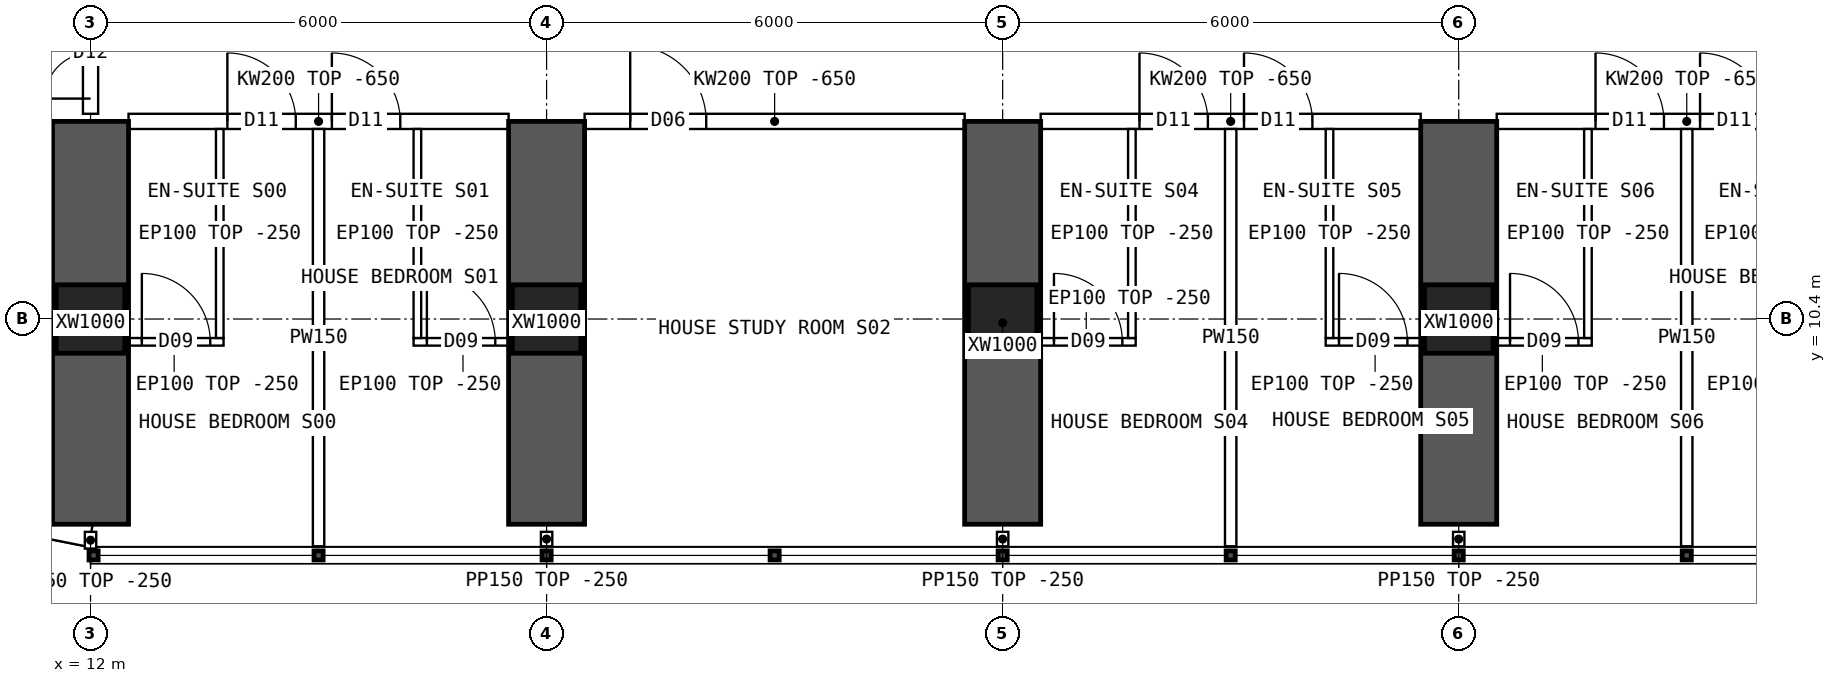
"""IFC4 building model, lengths in metres.
Left out: names, types, materials, properties, quantities, classifications, styles, units other than length and angle.
Written with IfcOpenShell. Run it as: python <this file> out.ifc"""

import sys

from ifc_helpers import new_model, si_unit, direction, frame, frame_2d, origin, origin_2d, place, context, subcontext, project, spatial, polyline, rectangle, hollow_rectangle, outline, extrude, element, fill, save


model = new_model("IFC4")
c1 = context("Model", 3, precision=1e-05, world=origin(), true_north=direction((0.0, 1.0)))
c2 = subcontext(c1, "Body", "Model", "MODEL_VIEW")
j1 = project(units=[si_unit("LENGTHUNIT", "METRE"), si_unit("PLANEANGLEUNIT", "RADIAN")], contexts=[c1])
p1 = place(None, origin())
s1 = spatial("IfcSite", under=j1, at=p1, CompositionType="ELEMENT")
p2 = place(p1, origin())
s2 = spatial("IfcBuilding", under=s1, at=p2, CompositionType="ELEMENT")
p3 = place(p2, frame((0.0, 0.0, 46.45)))
s3 = spatial("IfcBuildingStorey", under=s2, at=p3, CompositionType="ELEMENT", Elevation=46.45)
for number, where, z_axis, x_axis in (
    (1, (12.0, 10.4, 0.0), (0.0, 0.0, 1.0), (1.0, 0.0, 0.0)),
    (2, (18.0, 10.4, 0.0), (0.0, 0.0, 1.0), (1.0, 0.0, 0.0)),
    (3, (24.0, 10.4, 0.0), (0.0, 0.0, 1.0), (1.0, 0.0, 0.0)),
    (4, (30.0, 10.4, 0.0), (0.0, 0.0, 1.0), (1.0, 0.0, 0.0)),
):
    element("IfcColumn", number, at=place(p3, frame(where, z_axis=z_axis, x_axis=x_axis)), inside=s3, PredefinedType="COLUMN", context=c2, shape_type="SweptSolid", body=[
        extrude(hollow_rectangle(XDim=0.9, YDim=0.9, WallThickness=0.09, at=origin_2d()), origin(), (0.0, 0.0, 1.0), 3.75),
    ])
for number, where, z_axis, x_axis in (
    (5, (12.0, 7.7, 0.0), (0.0, 0.0, 1.0), (0.0, 1.0, 0.0)),
    (6, (18.0, 7.7, 0.0), (0.0, 0.0, 1.0), (0.0, 1.0, 0.0)),
    (7, (24.0, 7.7, 0.0), (0.0, 0.0, 1.0), (0.0, 1.0, 0.0)),
    (8, (30.0, 7.7, 0.0), (0.0, 0.0, 1.0), (0.0, 1.0, 0.0)),
):
    element("IfcWall", number, at=place(p3, frame(where, z_axis=z_axis, x_axis=x_axis)), inside=s3, PredefinedType="SHEAR", context=c2, shape_type="SweptSolid", body=[
        extrude(rectangle(XDim=5.3, YDim=1.0, at=frame_2d((2.65, 0.0))), origin(), (0.0, 0.0, 1.0), 3.75),
    ])
p4 = place(p3, frame((8.843, 8.178, 0.0), z_axis=(0.0, 0.0, 1.0), x_axis=(0.980787251524, -0.195080412259, 0.0)))
e9 = element("IfcWall", 9, at=p4, inside=s3, PredefinedType="SOLIDWALL", context=c2, shape_type="SweptSolid", body=[
    extrude(outline(polyline([(-0.03, -0.15), (3.249, -0.15), (3.189, 0.15), (0.03, 0.15), (-0.03, -0.15)])), origin(), (0.0, 0.0, 1.0), 3.5),
])
p5 = place(p4, frame((0.909, 0.0, 0.9)))
e10 = element("IfcOpeningElement", 10, at=p5, cuts=e9, PredefinedType="OPENING", context=c2, shape_type="SweptSolid", body=[
    extrude(rectangle(XDim=1.4, YDim=1.8, at=frame_2d((0.7, 0.9))), frame((0.0, 0.16, 0.0), z_axis=(0.0, -1.0, 0.0), x_axis=(1.0, 0.0, 0.0)), (0.0, 0.0, 1.0), 0.32),
])
p6 = place(p3, frame((12.5, 13.0, 0.0), z_axis=(0.0, 0.0, 1.0), x_axis=(1.0, 0.0, 0.0)))
e11 = element("IfcWall", 11, at=p6, inside=s3, PredefinedType="SOLIDWALL", context=c2, shape_type="SweptSolid", body=[
    extrude(outline(polyline([(0.0, 0.0), (5.0, 0.0), (5.0, 3.1), (0.0, 3.1), (0.0, 0.0)])), frame((0.0, 0.1, 0.0), z_axis=(0.0, -1.0, 0.0), x_axis=(1.0, 0.0, 0.0)), (0.0, 0.0, 1.0), 0.2),
])
p7 = place(p6, frame((1.3, 0.0, 0.0)))
e12 = element("IfcOpeningElement", 12, at=p7, cuts=e11, PredefinedType="OPENING", context=c2, shape_type="SweptSolid", body=[
    extrude(rectangle(XDim=0.9, YDim=2.1, at=frame_2d((0.45, 1.05))), frame((0.0, 0.11, 0.0), z_axis=(0.0, -1.0, 0.0), x_axis=(1.0, 0.0, 0.0)), (0.0, 0.0, 1.0), 0.22),
])
p8 = place(p6, frame((2.675, 0.0, 0.0)))
e13 = element("IfcOpeningElement", 13, at=p8, cuts=e11, PredefinedType="OPENING", context=c2, shape_type="SweptSolid", body=[
    extrude(rectangle(XDim=0.9, YDim=2.1, at=frame_2d((0.45, 1.05))), frame((0.0, 0.11, 0.0), z_axis=(0.0, -1.0, 0.0), x_axis=(1.0, 0.0, 0.0)), (0.0, 0.0, 1.0), 0.22),
])
p9 = place(p3, frame((18.5, 13.0, 0.0), z_axis=(0.0, 0.0, 1.0), x_axis=(1.0, 0.0, 0.0)))
e14 = element("IfcWall", 14, at=p9, inside=s3, PredefinedType="SOLIDWALL", context=c2, shape_type="SweptSolid", body=[
    extrude(outline(polyline([(0.0, 0.0), (5.0, 0.0), (5.0, 3.1), (0.0, 3.1), (0.0, 0.0)])), frame((0.0, 0.1, 0.0), z_axis=(0.0, -1.0, 0.0), x_axis=(1.0, 0.0, 0.0)), (0.0, 0.0, 1.0), 0.2),
])
p10 = place(p9, frame((0.6, 0.0, 0.0)))
e15 = element("IfcOpeningElement", 15, at=p10, cuts=e14, PredefinedType="OPENING", context=c2, shape_type="SweptSolid", body=[
    extrude(rectangle(XDim=1.0, YDim=2.1, at=frame_2d((0.5, 1.05))), frame((0.0, 0.11, 0.0), z_axis=(0.0, -1.0, 0.0), x_axis=(1.0, 0.0, 0.0)), (0.0, 0.0, 1.0), 0.22),
])
p11 = place(p3, frame((24.5, 13.0, 0.0), z_axis=(0.0, 0.0, 1.0), x_axis=(1.0, 0.0, 0.0)))
e16 = element("IfcWall", 16, at=p11, inside=s3, PredefinedType="SOLIDWALL", context=c2, shape_type="SweptSolid", body=[
    extrude(outline(polyline([(0.0, 0.0), (5.0, 0.0), (5.0, 3.1), (0.0, 3.1), (0.0, 0.0)])), frame((0.0, 0.1, 0.0), z_axis=(0.0, -1.0, 0.0), x_axis=(1.0, 0.0, 0.0)), (0.0, 0.0, 1.0), 0.2),
])
p12 = place(p11, frame((1.3, 0.0, 0.0)))
e17 = element("IfcOpeningElement", 17, at=p12, cuts=e16, PredefinedType="OPENING", context=c2, shape_type="SweptSolid", body=[
    extrude(rectangle(XDim=0.9, YDim=2.1, at=frame_2d((0.45, 1.05))), frame((0.0, 0.11, 0.0), z_axis=(0.0, -1.0, 0.0), x_axis=(1.0, 0.0, 0.0)), (0.0, 0.0, 1.0), 0.22),
])
p13 = place(p11, frame((2.675, 0.0, 0.0)))
e18 = element("IfcOpeningElement", 18, at=p13, cuts=e16, PredefinedType="OPENING", context=c2, shape_type="SweptSolid", body=[
    extrude(rectangle(XDim=0.9, YDim=2.1, at=frame_2d((0.45, 1.05))), frame((0.0, 0.11, 0.0), z_axis=(0.0, -1.0, 0.0), x_axis=(1.0, 0.0, 0.0)), (0.0, 0.0, 1.0), 0.22),
])
p14 = place(p3, frame((30.5, 13.0, 0.0), z_axis=(0.0, 0.0, 1.0), x_axis=(1.0, 0.0, 0.0)))
e19 = element("IfcWall", 19, at=p14, inside=s3, PredefinedType="SOLIDWALL", context=c2, shape_type="SweptSolid", body=[
    extrude(outline(polyline([(0.0, 0.0), (5.0, 0.0), (5.0, 3.1), (0.0, 3.1), (0.0, 0.0)])), frame((0.0, 0.1, 0.0), z_axis=(0.0, -1.0, 0.0), x_axis=(1.0, 0.0, 0.0)), (0.0, 0.0, 1.0), 0.2),
])
p15 = place(p14, frame((1.3, 0.0, 0.0)))
e20 = element("IfcOpeningElement", 20, at=p15, cuts=e19, PredefinedType="OPENING", context=c2, shape_type="SweptSolid", body=[
    extrude(rectangle(XDim=0.9, YDim=2.1, at=frame_2d((0.45, 1.05))), frame((0.0, 0.11, 0.0), z_axis=(0.0, -1.0, 0.0), x_axis=(1.0, 0.0, 0.0)), (0.0, 0.0, 1.0), 0.22),
])
p16 = place(p14, frame((2.675, 0.0, 0.0)))
e21 = element("IfcOpeningElement", 21, at=p16, cuts=e19, PredefinedType="OPENING", context=c2, shape_type="SweptSolid", body=[
    extrude(rectangle(XDim=0.9, YDim=2.1, at=frame_2d((0.45, 1.05))), frame((0.0, 0.11, 0.0), z_axis=(0.0, -1.0, 0.0), x_axis=(1.0, 0.0, 0.0)), (0.0, 0.0, 1.0), 0.22),
])
p17 = place(p3, frame((15.0, 7.41, 0.0), z_axis=(0.0, 0.0, 1.0), x_axis=(0.0, 1.0, 0.0)))
e22 = element("IfcWall", 22, at=p17, inside=s3, PredefinedType="PARTITIONING", context=c2, shape_type="SweptSolid", body=[
    extrude(outline(polyline([(0.0, 0.0), (5.49, 0.0), (5.49, 3.1), (5.442, 3.1), (5.44, 3.5), (3.192, 3.5), (3.19, 3.1), (2.792, 3.1), (2.79, 3.5), (0.0, 3.5), (0.0, 0.0)])), frame((0.0, 0.075, 0.0), z_axis=(0.0, -1.0, 0.0), x_axis=(1.0, 0.0, 0.0)), (0.0, 0.0, 1.0), 0.15),
])
p18 = place(p3, frame((13.75, 10.1, 0.0), z_axis=(0.0, 0.0, 1.0), x_axis=(-1.0, 0.0, 0.0)))
e23 = element("IfcWall", 23, at=p18, inside=s3, PredefinedType="PARTITIONING", context=c2, shape_type="SweptSolid", body=[
    extrude(rectangle(XDim=1.3, YDim=0.1, at=frame_2d((0.65, 0.0))), origin(), (0.0, 0.0, 1.0), 3.5),
])
p19 = place(p18, frame((0.175, 0.0, 0.0)))
e24 = element("IfcOpeningElement", 24, at=p19, cuts=e23, PredefinedType="OPENING", context=c2, shape_type="SweptSolid", body=[
    extrude(rectangle(XDim=0.9, YDim=2.1, at=frame_2d((0.45, 1.05))), frame((0.0, 0.06, 0.0), z_axis=(0.0, -1.0, 0.0), x_axis=(1.0, 0.0, 0.0)), (0.0, 0.0, 1.0), 0.12),
])
p20 = place(p3, frame((13.7, 10.15, 0.0), z_axis=(0.0, 0.0, 1.0), x_axis=(0.0, 1.0, 0.0)))
e25 = element("IfcWall", 25, at=p20, inside=s3, PredefinedType="PARTITIONING", context=c2, shape_type="SweptSolid", body=[
    extrude(outline(polyline([(0.0, 0.0), (2.75, 0.0), (2.75, 3.1), (2.702, 3.1), (2.7, 3.5), (0.452, 3.5), (0.45, 3.1), (0.052, 3.1), (0.05, 3.5), (0.0, 3.5), (0.0, 0.0)])), frame((0.0, 0.05, 0.0), z_axis=(0.0, -1.0, 0.0), x_axis=(1.0, 0.0, 0.0)), (0.0, 0.0, 1.0), 0.1),
])
p21 = place(p3, frame((17.55, 10.1, 0.0), z_axis=(0.0, 0.0, 1.0), x_axis=(-1.0, 0.0, 0.0)))
e26 = element("IfcWall", 26, at=p21, inside=s3, PredefinedType="PARTITIONING", context=c2, shape_type="SweptSolid", body=[
    extrude(rectangle(XDim=1.3, YDim=0.1, at=frame_2d((0.65, 0.0))), origin(), (0.0, 0.0, 1.0), 3.5),
])
p22 = place(p21, frame((0.225, 0.0, 0.0)))
e27 = element("IfcOpeningElement", 27, at=p22, cuts=e26, PredefinedType="OPENING", context=c2, shape_type="SweptSolid", body=[
    extrude(rectangle(XDim=0.9, YDim=2.1, at=frame_2d((0.45, 1.05))), frame((0.0, 0.06, 0.0), z_axis=(0.0, -1.0, 0.0), x_axis=(1.0, 0.0, 0.0)), (0.0, 0.0, 1.0), 0.12),
])
p23 = place(p3, frame((16.3, 10.15, 0.0), z_axis=(0.0, 0.0, 1.0), x_axis=(0.0, 1.0, 0.0)))
e28 = element("IfcWall", 28, at=p23, inside=s3, PredefinedType="PARTITIONING", context=c2, shape_type="SweptSolid", body=[
    extrude(outline(polyline([(0.0, 0.0), (2.75, 0.0), (2.75, 3.1), (2.702, 3.1), (2.7, 3.5), (0.452, 3.5), (0.45, 3.1), (0.052, 3.1), (0.05, 3.5), (0.0, 3.5), (0.0, 0.0)])), frame((0.0, 0.05, 0.0), z_axis=(0.0, -1.0, 0.0), x_axis=(1.0, 0.0, 0.0)), (0.0, 0.0, 1.0), 0.1),
])
p24 = place(p3, frame((27.0, 7.41, 0.0), z_axis=(0.0, 0.0, 1.0), x_axis=(0.0, 1.0, 0.0)))
e29 = element("IfcWall", 29, at=p24, inside=s3, PredefinedType="PARTITIONING", context=c2, shape_type="SweptSolid", body=[
    extrude(outline(polyline([(0.0, 0.0), (5.49, 0.0), (5.49, 3.1), (5.442, 3.1), (5.44, 3.5), (3.192, 3.5), (3.19, 3.1), (2.792, 3.1), (2.79, 3.5), (0.0, 3.5), (0.0, 0.0)])), frame((0.0, 0.075, 0.0), z_axis=(0.0, -1.0, 0.0), x_axis=(1.0, 0.0, 0.0)), (0.0, 0.0, 1.0), 0.15),
])
p25 = place(p3, frame((25.75, 10.1, 0.0), z_axis=(0.0, 0.0, 1.0), x_axis=(-1.0, 0.0, 0.0)))
e30 = element("IfcWall", 30, at=p25, inside=s3, PredefinedType="PARTITIONING", context=c2, shape_type="SweptSolid", body=[
    extrude(rectangle(XDim=1.3, YDim=0.1, at=frame_2d((0.65, 0.0))), origin(), (0.0, 0.0, 1.0), 3.5),
])
p26 = place(p25, frame((0.175, 0.0, 0.0)))
e31 = element("IfcOpeningElement", 31, at=p26, cuts=e30, PredefinedType="OPENING", context=c2, shape_type="SweptSolid", body=[
    extrude(rectangle(XDim=0.9, YDim=2.1, at=frame_2d((0.45, 1.05))), frame((0.0, 0.06, 0.0), z_axis=(0.0, -1.0, 0.0), x_axis=(1.0, 0.0, 0.0)), (0.0, 0.0, 1.0), 0.12),
])
p27 = place(p3, frame((25.7, 10.15, 0.0), z_axis=(0.0, 0.0, 1.0), x_axis=(0.0, 1.0, 0.0)))
e32 = element("IfcWall", 32, at=p27, inside=s3, PredefinedType="PARTITIONING", context=c2, shape_type="SweptSolid", body=[
    extrude(outline(polyline([(0.0, 0.0), (2.75, 0.0), (2.75, 3.1), (2.702, 3.1), (2.7, 3.5), (0.452, 3.5), (0.45, 3.1), (0.052, 3.1), (0.05, 3.5), (0.0, 3.5), (0.0, 0.0)])), frame((0.0, 0.05, 0.0), z_axis=(0.0, -1.0, 0.0), x_axis=(1.0, 0.0, 0.0)), (0.0, 0.0, 1.0), 0.1),
])
p28 = place(p3, frame((29.55, 10.1, 0.0), z_axis=(0.0, 0.0, 1.0), x_axis=(-1.0, 0.0, 0.0)))
e33 = element("IfcWall", 33, at=p28, inside=s3, PredefinedType="PARTITIONING", context=c2, shape_type="SweptSolid", body=[
    extrude(rectangle(XDim=1.3, YDim=0.1, at=frame_2d((0.65, 0.0))), origin(), (0.0, 0.0, 1.0), 3.5),
])
p29 = place(p28, frame((0.225, 0.0, 0.0)))
e34 = element("IfcOpeningElement", 34, at=p29, cuts=e33, PredefinedType="OPENING", context=c2, shape_type="SweptSolid", body=[
    extrude(rectangle(XDim=0.9, YDim=2.1, at=frame_2d((0.45, 1.05))), frame((0.0, 0.06, 0.0), z_axis=(0.0, -1.0, 0.0), x_axis=(1.0, 0.0, 0.0)), (0.0, 0.0, 1.0), 0.12),
])
p30 = place(p3, frame((28.3, 10.15, 0.0), z_axis=(0.0, 0.0, 1.0), x_axis=(0.0, 1.0, 0.0)))
e35 = element("IfcWall", 35, at=p30, inside=s3, PredefinedType="PARTITIONING", context=c2, shape_type="SweptSolid", body=[
    extrude(outline(polyline([(0.0, 0.0), (2.75, 0.0), (2.75, 3.1), (2.702, 3.1), (2.7, 3.5), (0.452, 3.5), (0.45, 3.1), (0.052, 3.1), (0.05, 3.5), (0.0, 3.5), (0.0, 0.0)])), frame((0.0, 0.05, 0.0), z_axis=(0.0, -1.0, 0.0), x_axis=(1.0, 0.0, 0.0)), (0.0, 0.0, 1.0), 0.1),
])
p31 = place(p3, frame((33.0, 7.41, 0.0), z_axis=(0.0, 0.0, 1.0), x_axis=(0.0, 1.0, 0.0)))
e36 = element("IfcWall", 36, at=p31, inside=s3, PredefinedType="PARTITIONING", context=c2, shape_type="SweptSolid", body=[
    extrude(outline(polyline([(0.0, 0.0), (5.49, 0.0), (5.49, 3.1), (5.442, 3.1), (5.44, 3.5), (3.192, 3.5), (3.19, 3.1), (2.792, 3.1), (2.79, 3.5), (0.0, 3.5), (0.0, 0.0)])), frame((0.0, 0.075, 0.0), z_axis=(0.0, -1.0, 0.0), x_axis=(1.0, 0.0, 0.0)), (0.0, 0.0, 1.0), 0.15),
])
p32 = place(p3, frame((31.75, 10.1, 0.0), z_axis=(0.0, 0.0, 1.0), x_axis=(-1.0, 0.0, 0.0)))
e37 = element("IfcWall", 37, at=p32, inside=s3, PredefinedType="PARTITIONING", context=c2, shape_type="SweptSolid", body=[
    extrude(rectangle(XDim=1.3, YDim=0.1, at=frame_2d((0.65, 0.0))), origin(), (0.0, 0.0, 1.0), 3.5),
])
p33 = place(p32, frame((0.175, 0.0, 0.0)))
e38 = element("IfcOpeningElement", 38, at=p33, cuts=e37, PredefinedType="OPENING", context=c2, shape_type="SweptSolid", body=[
    extrude(rectangle(XDim=0.9, YDim=2.1, at=frame_2d((0.45, 1.05))), frame((0.0, 0.06, 0.0), z_axis=(0.0, -1.0, 0.0), x_axis=(1.0, 0.0, 0.0)), (0.0, 0.0, 1.0), 0.12),
])
p34 = place(p3, frame((31.7, 10.15, 0.0), z_axis=(0.0, 0.0, 1.0), x_axis=(0.0, 1.0, 0.0)))
e39 = element("IfcWall", 39, at=p34, inside=s3, PredefinedType="PARTITIONING", context=c2, shape_type="SweptSolid", body=[
    extrude(outline(polyline([(0.0, 0.0), (2.75, 0.0), (2.75, 3.1), (2.702, 3.1), (2.7, 3.5), (0.452, 3.5), (0.45, 3.1), (0.052, 3.1), (0.05, 3.5), (0.0, 3.5), (0.0, 0.0)])), frame((0.0, 0.05, 0.0), z_axis=(0.0, -1.0, 0.0), x_axis=(1.0, 0.0, 0.0)), (0.0, 0.0, 1.0), 0.1),
])
p35 = place(p3, frame((12.0, 13.1, 0.0), z_axis=(0.0, 0.0, 1.0), x_axis=(0.0, 1.0, 0.0)))
e40 = element("IfcWall", 40, at=p35, inside=s3, PredefinedType="SOLIDWALL", context=c2, shape_type="SweptSolid", body=[
    extrude(outline(polyline([(0.0, 0.0), (1.6, 0.0), (1.6, 3.05), (0.0, 3.05), (0.0, 0.0)])), frame((0.0, 0.1, 0.0), z_axis=(0.0, -1.0, 0.0), x_axis=(1.0, 0.0, 0.0)), (0.0, 0.0, 1.0), 0.2),
])
p36 = place(p35, frame((0.2, 0.0, 0.0)))
e41 = element("IfcOpeningElement", 41, at=p36, cuts=e40, PredefinedType="OPENING", context=c2, shape_type="SweptSolid", body=[
    extrude(rectangle(XDim=1.2, YDim=2.1, at=frame_2d((0.6, 1.05))), frame((0.0, 0.11, 0.0), z_axis=(0.0, -1.0, 0.0), x_axis=(1.0, 0.0, 0.0)), (0.0, 0.0, 1.0), 0.22),
])
p37 = place(p3, frame((12.0, 7.6, 0.0), z_axis=(0.0, 0.0, 1.0), x_axis=(0.0, -1.0, 0.0)))
e42 = element("IfcWall", 42, at=p37, inside=s3, PredefinedType="PARTITIONING", context=c2, shape_type="SweptSolid", body=[
    extrude(rectangle(XDim=0.22, YDim=0.15, at=frame_2d((0.11, 0.0))), origin(), (0.0, 0.0, 1.0), 3.5),
])
for number, where, z_axis, x_axis in (
    (43, (18.0, 7.6, 0.0), (0.0, 0.0, 1.0), (0.0, -1.0, 0.0)),
    (44, (24.0, 7.6, 0.0), (0.0, 0.0, 1.0), (0.0, -1.0, 0.0)),
    (45, (30.0, 7.6, 0.0), (0.0, 0.0, 1.0), (0.0, -1.0, 0.0)),
):
    element("IfcWall", number, at=place(p3, frame(where, z_axis=z_axis, x_axis=x_axis)), inside=s3, PredefinedType="PARTITIONING", context=c2, shape_type="SweptSolid", body=[
        extrude(rectangle(XDim=0.19, YDim=0.15, at=frame_2d((0.095, 0.0))), origin(), (0.0, 0.0, 1.0), 3.5),
    ])
p38 = place(p19, origin())
e46 = element("IfcDoor", 46, at=p38, inside=s3, OperationType="SINGLE_SWING_RIGHT", PredefinedType="DOOR", context=c2, shape_type="SweptSolid", body=[
    extrude(rectangle(XDim=0.9, YDim=2.1, at=frame_2d((0.45, 1.05))), frame((0.0, 0.025, 0.0), z_axis=(0.0, -1.0, 0.0), x_axis=(1.0, 0.0, 0.0)), (0.0, 0.0, 1.0), 0.05),
])
fill(e24, e46)
p39 = place(p7, origin())
e47 = element("IfcDoor", 47, at=p39, inside=s3, OperationType="SINGLE_SWING_LEFT", PredefinedType="DOOR", context=c2, shape_type="SweptSolid", body=[
    extrude(rectangle(XDim=0.9, YDim=2.1, at=frame_2d((0.45, 1.05))), frame((0.0, 0.025, 0.0), z_axis=(0.0, -1.0, 0.0), x_axis=(1.0, 0.0, 0.0)), (0.0, 0.0, 1.0), 0.05),
])
fill(e12, e47)
p40 = place(p22, origin())
e48 = element("IfcDoor", 48, at=p40, inside=s3, OperationType="SINGLE_SWING_RIGHT", PredefinedType="DOOR", context=c2, shape_type="SweptSolid", body=[
    extrude(rectangle(XDim=0.9, YDim=2.1, at=frame_2d((0.45, 1.05))), frame((0.0, 0.025, 0.0), z_axis=(0.0, -1.0, 0.0), x_axis=(1.0, 0.0, 0.0)), (0.0, 0.0, 1.0), 0.05),
])
fill(e27, e48)
p41 = place(p8, origin())
e49 = element("IfcDoor", 49, at=p41, inside=s3, OperationType="SINGLE_SWING_LEFT", PredefinedType="DOOR", context=c2, shape_type="SweptSolid", body=[
    extrude(rectangle(XDim=0.9, YDim=2.1, at=frame_2d((0.45, 1.05))), frame((0.0, 0.025, 0.0), z_axis=(0.0, -1.0, 0.0), x_axis=(1.0, 0.0, 0.0)), (0.0, 0.0, 1.0), 0.05),
])
fill(e13, e49)
p42 = place(p10, origin())
e50 = element("IfcDoor", 50, at=p42, inside=s3, OperationType="SINGLE_SWING_LEFT", PredefinedType="DOOR", context=c2, shape_type="SweptSolid", body=[
    extrude(rectangle(XDim=1.0, YDim=2.1, at=frame_2d((0.5, 1.05))), frame((0.0, 0.025, 0.0), z_axis=(0.0, -1.0, 0.0), x_axis=(1.0, 0.0, 0.0)), (0.0, 0.0, 1.0), 0.05),
])
fill(e15, e50)
p43 = place(p26, origin())
e51 = element("IfcDoor", 51, at=p43, inside=s3, OperationType="SINGLE_SWING_RIGHT", PredefinedType="DOOR", context=c2, shape_type="SweptSolid", body=[
    extrude(rectangle(XDim=0.9, YDim=2.1, at=frame_2d((0.45, 1.05))), frame((0.0, 0.025, 0.0), z_axis=(0.0, -1.0, 0.0), x_axis=(1.0, 0.0, 0.0)), (0.0, 0.0, 1.0), 0.05),
])
fill(e31, e51)
p44 = place(p12, origin())
e52 = element("IfcDoor", 52, at=p44, inside=s3, OperationType="SINGLE_SWING_LEFT", PredefinedType="DOOR", context=c2, shape_type="SweptSolid", body=[
    extrude(rectangle(XDim=0.9, YDim=2.1, at=frame_2d((0.45, 1.05))), frame((0.0, 0.025, 0.0), z_axis=(0.0, -1.0, 0.0), x_axis=(1.0, 0.0, 0.0)), (0.0, 0.0, 1.0), 0.05),
])
fill(e17, e52)
p45 = place(p29, origin())
e53 = element("IfcDoor", 53, at=p45, inside=s3, OperationType="SINGLE_SWING_RIGHT", PredefinedType="DOOR", context=c2, shape_type="SweptSolid", body=[
    extrude(rectangle(XDim=0.9, YDim=2.1, at=frame_2d((0.45, 1.05))), frame((0.0, 0.025, 0.0), z_axis=(0.0, -1.0, 0.0), x_axis=(1.0, 0.0, 0.0)), (0.0, 0.0, 1.0), 0.05),
])
fill(e34, e53)
p46 = place(p13, origin())
e54 = element("IfcDoor", 54, at=p46, inside=s3, OperationType="SINGLE_SWING_LEFT", PredefinedType="DOOR", context=c2, shape_type="SweptSolid", body=[
    extrude(rectangle(XDim=0.9, YDim=2.1, at=frame_2d((0.45, 1.05))), frame((0.0, 0.025, 0.0), z_axis=(0.0, -1.0, 0.0), x_axis=(1.0, 0.0, 0.0)), (0.0, 0.0, 1.0), 0.05),
])
fill(e18, e54)
p47 = place(p33, origin())
e55 = element("IfcDoor", 55, at=p47, inside=s3, OperationType="SINGLE_SWING_RIGHT", PredefinedType="DOOR", context=c2, shape_type="SweptSolid", body=[
    extrude(rectangle(XDim=0.9, YDim=2.1, at=frame_2d((0.45, 1.05))), frame((0.0, 0.025, 0.0), z_axis=(0.0, -1.0, 0.0), x_axis=(1.0, 0.0, 0.0)), (0.0, 0.0, 1.0), 0.05),
])
fill(e38, e55)
p48 = place(p15, origin())
e56 = element("IfcDoor", 56, at=p48, inside=s3, OperationType="SINGLE_SWING_LEFT", PredefinedType="DOOR", context=c2, shape_type="SweptSolid", body=[
    extrude(rectangle(XDim=0.9, YDim=2.1, at=frame_2d((0.45, 1.05))), frame((0.0, 0.025, 0.0), z_axis=(0.0, -1.0, 0.0), x_axis=(1.0, 0.0, 0.0)), (0.0, 0.0, 1.0), 0.05),
])
fill(e20, e56)
p49 = place(p16, origin())
e57 = element("IfcDoor", 57, at=p49, inside=s3, OperationType="SINGLE_SWING_LEFT", PredefinedType="DOOR", context=c2, shape_type="SweptSolid", body=[
    extrude(rectangle(XDim=0.9, YDim=2.1, at=frame_2d((0.45, 1.05))), frame((0.0, 0.025, 0.0), z_axis=(0.0, -1.0, 0.0), x_axis=(1.0, 0.0, 0.0)), (0.0, 0.0, 1.0), 0.05),
])
fill(e21, e57)
p50 = place(p36, origin())
e58 = element("IfcDoor", 58, at=p50, inside=s3, OperationType="DOUBLE_DOOR_SINGLE_SWING", PredefinedType="DOOR", context=c2, shape_type="SweptSolid", body=[
    extrude(rectangle(XDim=1.2, YDim=2.1, at=frame_2d((0.6, 1.05))), frame((0.0, 0.025, 0.0), z_axis=(0.0, -1.0, 0.0), x_axis=(1.0, 0.0, 0.0)), (0.0, 0.0, 1.0), 0.05),
])
fill(e41, e58)
save(model, sys.argv[1])
